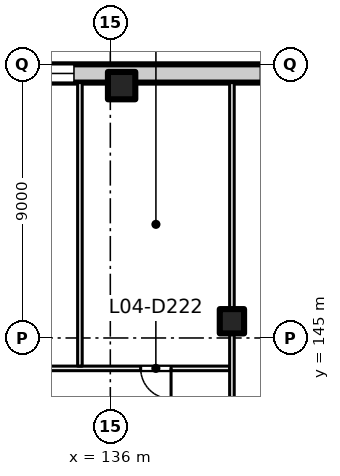
"""IFC4 building model, lengths in metres.
Left out: names, types, materials, properties, quantities, classifications, styles, units other than length and angle.
Written with IfcOpenShell. Run it as: python <this file> out.ifc"""

import sys

from ifc_helpers import new_model, si_unit, direction, frame, frame_2d, origin, origin_2d, place, context, subcontext, project, spatial, rectangle, extrude, element, fill, save


model = new_model("IFC4")
c1 = context("Model", 3, precision=1e-05, world=origin(), true_north=direction((0.0, 1.0)))
c2 = subcontext(c1, "Body", "Model", "MODEL_VIEW")
j1 = project(units=[si_unit("LENGTHUNIT", "METRE"), si_unit("PLANEANGLEUNIT", "RADIAN")], contexts=[c1])
p1 = place(None, origin())
s1 = spatial("IfcSite", under=j1, at=p1, CompositionType="ELEMENT")
p2 = place(p1, origin())
s2 = spatial("IfcBuilding", under=s1, at=p2, CompositionType="ELEMENT")
p3 = place(p2, frame((0.0, 0.0, 22.5)))
s3 = spatial("IfcBuildingStorey", under=s2, at=p3, CompositionType="ELEMENT", Elevation=22.5)
p4 = place(p3, frame((136.372, 153.3, 0.0), z_axis=(0.0, 0.0, 1.0), x_axis=(1.0, 0.0, 0.0)))
e1 = element("IfcColumn", 1, at=p4, inside=s3, PredefinedType="COLUMN", context=c2, shape_type="SweptSolid", body=[
    extrude(rectangle(XDim=0.9, YDim=0.9, at=origin_2d()), origin(), (0.0, 0.0, 1.0), 5.0),
])
p5 = place(p3, frame((140.0, 145.55, 0.0), z_axis=(0.0, 0.0, 1.0), x_axis=(1.0, 0.0, 0.0)))
e2 = element("IfcColumn", 2, at=p5, inside=s3, PredefinedType="COLUMN", context=c2, shape_type="SweptSolid", body=[
    extrude(rectangle(XDim=0.8, YDim=0.8, at=origin_2d()), origin(), (0.0, 0.0, 1.0), 5.0),
])
p6 = place(p3, frame((131.022, 153.7, 0.0), z_axis=(0.0, 0.0, 1.0), x_axis=(1.0, 0.0, 0.0)))
e3 = element("IfcWall", 3, at=p6, inside=s3, PredefinedType="SOLIDWALL", context=c2, shape_type="SweptSolid", body=[
    extrude(rectangle(XDim=31.957, YDim=0.6, at=frame_2d((15.978, 0.0))), origin(), (0.0, 0.0, 1.0), 4.625),
])
p7 = place(p6, frame((0.783, 0.0, 0.9)))
e4 = element("IfcOpeningElement", 4, at=p7, cuts=e3, PredefinedType="OPENING", context=c2, shape_type="SweptSolid", body=[
    extrude(rectangle(XDim=3.0, YDim=3.0, at=frame_2d((1.5, 1.5))), frame((0.0, 0.31, 0.0), z_axis=(0.0, -1.0, 0.0), x_axis=(1.0, 0.0, 0.0)), (0.0, 0.0, 1.0), 0.62),
])
p8 = place(p6, frame((9.913, 0.0, 0.9)))
e5 = element("IfcOpeningElement", 5, at=p8, cuts=e3, PredefinedType="OPENING", context=c2, shape_type="SweptSolid", body=[
    extrude(rectangle(XDim=3.0, YDim=3.0, at=frame_2d((1.5, 1.5))), frame((0.0, 0.31, 0.0), z_axis=(0.0, -1.0, 0.0), x_axis=(1.0, 0.0, 0.0)), (0.0, 0.0, 1.0), 0.62),
])
p9 = place(p6, frame((14.928, 0.0, 0.9)))
e6 = element("IfcOpeningElement", 6, at=p9, cuts=e3, PredefinedType="OPENING", context=c2, shape_type="SweptSolid", body=[
    extrude(rectangle(XDim=3.0, YDim=3.0, at=frame_2d((1.5, 1.5))), frame((0.0, 0.31, 0.0), z_axis=(0.0, -1.0, 0.0), x_axis=(1.0, 0.0, 0.0)), (0.0, 0.0, 1.0), 0.62),
])
p10 = place(p6, frame((19.043, 0.0, 0.9)))
e7 = element("IfcOpeningElement", 7, at=p10, cuts=e3, PredefinedType="OPENING", context=c2, shape_type="SweptSolid", body=[
    extrude(rectangle(XDim=3.0, YDim=3.0, at=frame_2d((1.5, 1.5))), frame((0.0, 0.31, 0.0), z_axis=(0.0, -1.0, 0.0), x_axis=(1.0, 0.0, 0.0)), (0.0, 0.0, 1.0), 0.62),
])
p11 = place(p6, frame((23.609, 0.0, 0.9)))
e8 = element("IfcOpeningElement", 8, at=p11, cuts=e3, PredefinedType="OPENING", context=c2, shape_type="SweptSolid", body=[
    extrude(rectangle(XDim=3.0, YDim=3.0, at=frame_2d((1.5, 1.5))), frame((0.0, 0.31, 0.0), z_axis=(0.0, -1.0, 0.0), x_axis=(1.0, 0.0, 0.0)), (0.0, 0.0, 1.0), 0.62),
])
p12 = place(p6, frame((27.724, 0.0, 0.9)))
e9 = element("IfcOpeningElement", 9, at=p12, cuts=e3, PredefinedType="OPENING", context=c2, shape_type="SweptSolid", body=[
    extrude(rectangle(XDim=3.0, YDim=3.0, at=frame_2d((1.5, 1.5))), frame((0.0, 0.31, 0.0), z_axis=(0.0, -1.0, 0.0), x_axis=(1.0, 0.0, 0.0)), (0.0, 0.0, 1.0), 0.62),
])
p13 = place(p3, frame((126.998, 144.0, 0.0), z_axis=(0.0, 0.0, 1.0), x_axis=(1.0, 0.0, 0.0)))
e10 = element("IfcWall", 10, at=p13, inside=s3, PredefinedType="PARTITIONING", context=c2, shape_type="SweptSolid", body=[
    extrude(rectangle(XDim=12.927, YDim=0.15, at=frame_2d((6.463, 0.0))), origin(), (0.0, 0.0, 1.0), 4.625),
])
p14 = place(p13, frame((3.504, 0.0, 0.0)))
e11 = element("IfcOpeningElement", 11, at=p14, cuts=e10, PredefinedType="OPENING", context=c2, shape_type="SweptSolid", body=[
    extrude(rectangle(XDim=1.0, YDim=2.1, at=frame_2d((0.5, 1.05))), frame((0.0, 0.085, 0.0), z_axis=(0.0, -1.0, 0.0), x_axis=(1.0, 0.0, 0.0)), (0.0, 0.0, 1.0), 0.17),
])
p15 = place(p13, frame((10.0, 0.0, 0.0)))
e12 = element("IfcOpeningElement", 12, at=p15, cuts=e10, PredefinedType="OPENING", context=c2, shape_type="SweptSolid", body=[
    extrude(rectangle(XDim=1.0, YDim=2.1, at=frame_2d((0.5, 1.05))), frame((0.0, 0.085, 0.0), z_axis=(0.0, -1.0, 0.0), x_axis=(1.0, 0.0, 0.0)), (0.0, 0.0, 1.0), 0.17),
])
p16 = place(p3, frame((135.0, 144.075, 0.0), z_axis=(0.0, 0.0, 1.0), x_axis=(0.0, 1.0, 0.0)))
e13 = element("IfcWall", 13, at=p16, inside=s3, PredefinedType="PARTITIONING", context=c2, shape_type="SweptSolid", body=[
    extrude(rectangle(XDim=9.325, YDim=0.15, at=frame_2d((4.663, 0.0))), origin(), (0.0, 0.0, 1.0), 4.625),
])
p17 = place(p3, frame((140.0, 139.0, 0.0), z_axis=(0.0, 0.0, 1.0), x_axis=(0.0, 1.0, 0.0)))
e14 = element("IfcWall", 14, at=p17, inside=s3, PredefinedType="PARTITIONING", context=c2, shape_type="SweptSolid", body=[
    extrude(rectangle(XDim=14.4, YDim=0.15, at=frame_2d((7.2, 0.0))), origin(), (0.0, 0.0, 1.0), 4.625),
])
p18 = place(p7, origin())
e15 = element("IfcWindow", 15, at=p18, inside=s3, PartitioningType="SINGLE_PANEL", PredefinedType="WINDOW", context=c2, shape_type="SweptSolid", body=[
    extrude(rectangle(XDim=3.0, YDim=3.0, at=frame_2d((1.5, 1.5))), frame((0.0, 0.03, 0.0), z_axis=(0.0, -1.0, 0.0), x_axis=(1.0, 0.0, 0.0)), (0.0, 0.0, 1.0), 0.06),
])
fill(e4, e15)
p19 = place(p15, origin())
e16 = element("IfcDoor", 16, at=p19, inside=s3, OperationType="SINGLE_SWING_RIGHT", PredefinedType="DOOR", context=c2, shape_type="SweptSolid", body=[
    extrude(rectangle(XDim=1.0, YDim=2.1, at=frame_2d((0.5, 1.05))), frame((0.0, 0.025, 0.0), z_axis=(0.0, -1.0, 0.0), x_axis=(1.0, 0.0, 0.0)), (0.0, 0.0, 1.0), 0.05),
])
fill(e12, e16)
save(model, sys.argv[1])
